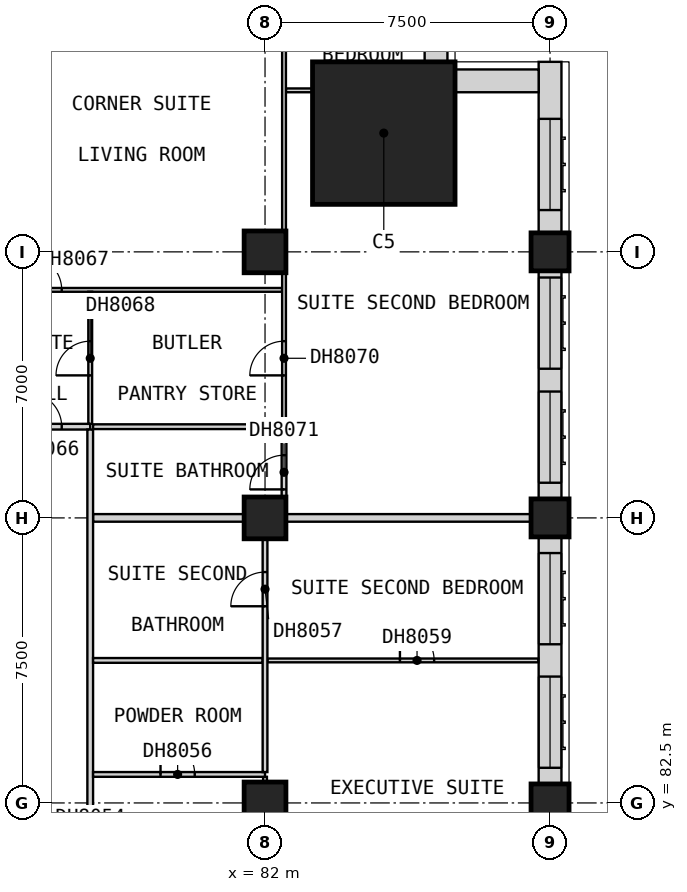
"""IFC4 building model, lengths in metres.
Left out: names, types, materials, properties, quantities, classifications, styles, units other than length and angle.
Written with IfcOpenShell. Run it as: python <this file> out.ifc"""

import sys

from ifc_helpers import new_model, si_unit, direction, frame, frame_2d, origin, origin_2d, place, context, subcontext, project, spatial, rectangle, extrude, element, fill, save


model = new_model("IFC4")
c1 = context("Model", 3, precision=1e-05, world=origin(), true_north=direction((0.0, 1.0)))
c2 = subcontext(c1, "Body", "Model", "MODEL_VIEW")
j1 = project(units=[si_unit("LENGTHUNIT", "METRE"), si_unit("PLANEANGLEUNIT", "RADIAN")], contexts=[c1])
p1 = place(None, origin())
s1 = spatial("IfcSite", under=j1, at=p1, CompositionType="ELEMENT")
p2 = place(p1, origin())
s2 = spatial("IfcBuilding", under=s1, at=p2, CompositionType="ELEMENT")
p3 = place(p2, frame((0.0, 0.0, 89.9)))
s3 = spatial("IfcBuildingStorey", under=s2, at=p3, CompositionType="ELEMENT", Elevation=89.9)
for number, where, z_axis, x_axis in (
    (1, (82.0, 82.5, 0.0), (0.0, 0.0, 1.0), (1.0, 0.0, 0.0)),
    (2, (82.0, 90.0, 0.0), (0.0, 0.0, 1.0), (1.0, 0.0, 0.0)),
    (3, (82.0, 97.0, 0.0), (0.0, 0.0, 1.0), (1.0, 0.0, 0.0)),
):
    element("IfcColumn", number, at=place(p3, frame(where, z_axis=z_axis, x_axis=x_axis)), inside=s3, PredefinedType="COLUMN", context=c2, shape_type="SweptSolid", body=[
        extrude(rectangle(XDim=1.1, YDim=1.1, at=origin_2d()), origin(), (0.0, 0.0, 1.0), 3.6),
    ])
for number, where, z_axis, x_axis in (
    (4, (89.5, 82.5, 0.0), (0.0, 0.0, 1.0), (1.0, 0.0, 0.0)),
    (5, (89.5, 90.0, 0.0), (0.0, 0.0, 1.0), (1.0, 0.0, 0.0)),
    (6, (89.5, 97.0, 0.0), (0.0, 0.0, 1.0), (1.0, 0.0, 0.0)),
):
    element("IfcColumn", number, at=place(p3, frame(where, z_axis=z_axis, x_axis=x_axis)), inside=s3, PredefinedType="COLUMN", context=c2, shape_type="SweptSolid", body=[
        extrude(rectangle(XDim=1.0, YDim=1.0, at=origin_2d()), origin(), (0.0, 0.0, 1.0), 3.6),
    ])
p4 = place(p3, frame((85.125, 100.125, 0.0), z_axis=(0.0, 0.0, 1.0), x_axis=(1.0, 0.0, 0.0)))
e7 = element("IfcColumn", 7, at=p4, inside=s3, PredefinedType="COLUMN", context=c2, shape_type="SweptSolid", body=[
    extrude(rectangle(XDim=3.75, YDim=3.75, at=origin_2d()), origin(), (0.0, 0.0, 1.0), 3.6),
])
p5 = place(p3, frame((89.5, 83.0, 0.0), z_axis=(0.0, 0.0, 1.0), x_axis=(0.0, 1.0, 0.0)))
e8 = element("IfcWall", 8, at=p5, inside=s3, PredefinedType="SOLIDWALL", context=c2, shape_type="SweptSolid", body=[
    extrude(rectangle(XDim=6.5, YDim=0.6, at=frame_2d((3.25, 0.0))), origin(), (0.0, 0.0, 1.0), 2.85),
])
p6 = place(p5, frame((0.425, 0.0, 0.8)))
e9 = element("IfcOpeningElement", 9, at=p6, cuts=e8, PredefinedType="OPENING", context=c2, shape_type="SweptSolid", body=[
    extrude(rectangle(XDim=2.4, YDim=1.8, at=frame_2d((1.2, 0.9))), frame((0.0, 0.31, 0.0), z_axis=(0.0, -1.0, 0.0), x_axis=(1.0, 0.0, 0.0)), (0.0, 0.0, 1.0), 0.62),
])
p7 = place(p5, frame((3.675, 0.0, 0.8)))
e10 = element("IfcOpeningElement", 10, at=p7, cuts=e8, PredefinedType="OPENING", context=c2, shape_type="SweptSolid", body=[
    extrude(rectangle(XDim=2.4, YDim=1.8, at=frame_2d((1.2, 0.9))), frame((0.0, 0.31, 0.0), z_axis=(0.0, -1.0, 0.0), x_axis=(1.0, 0.0, 0.0)), (0.0, 0.0, 1.0), 0.62),
])
p8 = place(p3, frame((89.5, 90.5, 0.0), z_axis=(0.0, 0.0, 1.0), x_axis=(0.0, 1.0, 0.0)))
e11 = element("IfcWall", 11, at=p8, inside=s3, PredefinedType="SOLIDWALL", context=c2, shape_type="SweptSolid", body=[
    extrude(rectangle(XDim=6.0, YDim=0.6, at=frame_2d((3.0, 0.0))), origin(), (0.0, 0.0, 1.0), 2.85),
])
p9 = place(p8, frame((0.425, 0.0, 0.8)))
e12 = element("IfcOpeningElement", 12, at=p9, cuts=e11, PredefinedType="OPENING", context=c2, shape_type="SweptSolid", body=[
    extrude(rectangle(XDim=2.4, YDim=1.8, at=frame_2d((1.2, 0.9))), frame((0.0, 0.31, 0.0), z_axis=(0.0, -1.0, 0.0), x_axis=(1.0, 0.0, 0.0)), (0.0, 0.0, 1.0), 0.62),
])
p10 = place(p8, frame((3.425, 0.0, 0.8)))
e13 = element("IfcOpeningElement", 13, at=p10, cuts=e11, PredefinedType="OPENING", context=c2, shape_type="SweptSolid", body=[
    extrude(rectangle(XDim=2.4, YDim=1.8, at=frame_2d((1.2, 0.9))), frame((0.0, 0.31, 0.0), z_axis=(0.0, -1.0, 0.0), x_axis=(1.0, 0.0, 0.0)), (0.0, 0.0, 1.0), 0.62),
])
p11 = place(p3, frame((89.5, 97.5, 0.0), z_axis=(0.0, 0.0, 1.0), x_axis=(0.0, 1.0, 0.0)))
e14 = element("IfcWall", 14, at=p11, inside=s3, PredefinedType="SOLIDWALL", context=c2, shape_type="SweptSolid", body=[
    extrude(rectangle(XDim=4.5, YDim=0.6, at=frame_2d((2.25, 0.0))), origin(), (0.0, 0.0, 1.0), 2.85),
])
p12 = place(p11, frame((0.6, 0.0, 0.8)))
e15 = element("IfcOpeningElement", 15, at=p12, cuts=e14, PredefinedType="OPENING", context=c2, shape_type="SweptSolid", body=[
    extrude(rectangle(XDim=2.4, YDim=1.8, at=frame_2d((1.2, 0.9))), frame((0.0, 0.31, 0.0), z_axis=(0.0, -1.0, 0.0), x_axis=(1.0, 0.0, 0.0)), (0.0, 0.0, 1.0), 0.62),
])
for number, where, z_axis, x_axis in (
    (16, (89.2, 101.5, 0.0), (0.0, 0.0, 1.0), (-1.0, 0.0, 0.0)),
    (17, (86.5, 102.0, 0.0), (0.0, 0.0, 1.0), (0.0, 1.0, 0.0)),
):
    element("IfcWall", number, at=place(p3, frame(where, z_axis=z_axis, x_axis=x_axis)), inside=s3, PredefinedType="SOLIDWALL", context=c2, shape_type="SweptSolid", body=[
        extrude(rectangle(XDim=2.2, YDim=0.6, at=frame_2d((1.1, 0.0))), origin(), (0.0, 0.0, 1.0), 3.35),
    ])
p13 = place(p3, frame((77.475, 90.0, 0.0), z_axis=(0.0, 0.0, 1.0), x_axis=(1.0, 0.0, 0.0)))
e18 = element("IfcWall", 18, at=p13, inside=s3, PredefinedType="PARTITIONING", context=c2, shape_type="SweptSolid", body=[
    extrude(rectangle(XDim=12.525, YDim=0.2, at=frame_2d((6.262, 0.0))), origin(), (0.0, 0.0, 1.0), 3.35),
])
p14 = place(p3, frame((33.75, 92.4, 0.0), z_axis=(0.0, 0.0, 1.0), x_axis=(1.0, 0.0, 0.0)))
e19 = element("IfcWall", 19, at=p14, inside=s3, PredefinedType="PARTITIONING", context=c2, shape_type="SweptSolid", body=[
    extrude(rectangle(XDim=43.65, YDim=0.15, at=frame_2d((21.825, 0.0))), origin(), (0.0, 0.0, 1.0), 3.35),
])
p15 = place(p14, frame((5.175, 0.0, 0.0)))
e20 = element("IfcOpeningElement", 20, at=p15, cuts=e19, PredefinedType="OPENING", context=c2, shape_type="SweptSolid", body=[
    extrude(rectangle(XDim=0.9, YDim=2.1, at=frame_2d((0.45, 1.05))), frame((0.0, 0.085, 0.0), z_axis=(0.0, -1.0, 0.0), x_axis=(1.0, 0.0, 0.0)), (0.0, 0.0, 1.0), 0.17),
])
p16 = place(p14, frame((13.05, 0.0, 0.0)))
e21 = element("IfcOpeningElement", 21, at=p16, cuts=e19, PredefinedType="OPENING", context=c2, shape_type="SweptSolid", body=[
    extrude(rectangle(XDim=0.9, YDim=2.1, at=frame_2d((0.45, 1.05))), frame((0.0, 0.085, 0.0), z_axis=(0.0, -1.0, 0.0), x_axis=(1.0, 0.0, 0.0)), (0.0, 0.0, 1.0), 0.17),
])
p17 = place(p14, frame((20.55, 0.0, 0.0)))
e22 = element("IfcOpeningElement", 22, at=p17, cuts=e19, PredefinedType="OPENING", context=c2, shape_type="SweptSolid", body=[
    extrude(rectangle(XDim=0.9, YDim=2.1, at=frame_2d((0.45, 1.05))), frame((0.0, 0.085, 0.0), z_axis=(0.0, -1.0, 0.0), x_axis=(1.0, 0.0, 0.0)), (0.0, 0.0, 1.0), 0.17),
])
p18 = place(p14, frame((32.363, 0.0, 0.0)))
e23 = element("IfcOpeningElement", 23, at=p18, cuts=e19, PredefinedType="OPENING", context=c2, shape_type="SweptSolid", body=[
    extrude(rectangle(XDim=0.9, YDim=2.1, at=frame_2d((0.45, 1.05))), frame((0.0, 0.085, 0.0), z_axis=(0.0, -1.0, 0.0), x_axis=(1.0, 0.0, 0.0)), (0.0, 0.0, 1.0), 0.17),
])
p19 = place(p14, frame((39.3, 0.0, 0.0)))
e24 = element("IfcOpeningElement", 24, at=p19, cuts=e19, PredefinedType="OPENING", context=c2, shape_type="SweptSolid", body=[
    extrude(rectangle(XDim=0.9, YDim=2.1, at=frame_2d((0.45, 1.05))), frame((0.0, 0.085, 0.0), z_axis=(0.0, -1.0, 0.0), x_axis=(1.0, 0.0, 0.0)), (0.0, 0.0, 1.0), 0.17),
])
p20 = place(p14, frame((42.0, 0.0, 0.0)))
e25 = element("IfcOpeningElement", 25, at=p20, cuts=e19, PredefinedType="OPENING", context=c2, shape_type="SweptSolid", body=[
    extrude(rectangle(XDim=0.9, YDim=2.1, at=frame_2d((0.45, 1.05))), frame((0.0, 0.085, 0.0), z_axis=(0.0, -1.0, 0.0), x_axis=(1.0, 0.0, 0.0)), (0.0, 0.0, 1.0), 0.17),
])
p21 = place(p3, frame((77.4, 50.175, 0.0), z_axis=(0.0, 0.0, 1.0), x_axis=(0.0, 1.0, 0.0)))
e26 = element("IfcWall", 26, at=p21, inside=s3, PredefinedType="PARTITIONING", context=c2, shape_type="SweptSolid", body=[
    extrude(rectangle(XDim=42.15, YDim=0.15, at=frame_2d((21.075, 0.0))), origin(), (0.0, 0.0, 1.0), 3.35),
])
p22 = place(p21, frame((7.875, 0.0, 0.0)))
e27 = element("IfcOpeningElement", 27, at=p22, cuts=e26, PredefinedType="OPENING", context=c2, shape_type="SweptSolid", body=[
    extrude(rectangle(XDim=0.9, YDim=2.1, at=frame_2d((0.45, 1.05))), frame((0.0, 0.085, 0.0), z_axis=(0.0, -1.0, 0.0), x_axis=(1.0, 0.0, 0.0)), (0.0, 0.0, 1.0), 0.17),
])
p23 = place(p21, frame((15.375, 0.0, 0.0)))
e28 = element("IfcOpeningElement", 28, at=p23, cuts=e26, PredefinedType="OPENING", context=c2, shape_type="SweptSolid", body=[
    extrude(rectangle(XDim=0.9, YDim=2.1, at=frame_2d((0.45, 1.05))), frame((0.0, 0.085, 0.0), z_axis=(0.0, -1.0, 0.0), x_axis=(1.0, 0.0, 0.0)), (0.0, 0.0, 1.0), 0.17),
])
p24 = place(p21, frame((30.375, 0.0, 0.0)))
e29 = element("IfcOpeningElement", 29, at=p24, cuts=e26, PredefinedType="OPENING", context=c2, shape_type="SweptSolid", body=[
    extrude(rectangle(XDim=0.9, YDim=2.1, at=frame_2d((0.45, 1.05))), frame((0.0, 0.085, 0.0), z_axis=(0.0, -1.0, 0.0), x_axis=(1.0, 0.0, 0.0)), (0.0, 0.0, 1.0), 0.17),
])
p25 = place(p3, frame((82.062, 86.25, 0.0), z_axis=(0.0, 0.0, 1.0), x_axis=(1.0, 0.0, 0.0)))
e30 = element("IfcWall", 30, at=p25, inside=s3, PredefinedType="PARTITIONING", context=c2, shape_type="SweptSolid", body=[
    extrude(rectangle(XDim=7.127, YDim=0.1, at=frame_2d((3.564, 0.0))), origin(), (0.0, 0.0, 1.0), 3.35),
])
p26 = place(p25, frame((3.488, 0.0, 0.0)))
e31 = element("IfcOpeningElement", 31, at=p26, cuts=e30, PredefinedType="OPENING", context=c2, shape_type="SweptSolid", body=[
    extrude(rectangle(XDim=0.9, YDim=2.1, at=frame_2d((0.45, 1.05))), frame((0.0, 0.06, 0.0), z_axis=(0.0, -1.0, 0.0), x_axis=(1.0, 0.0, 0.0)), (0.0, 0.0, 1.0), 0.12),
])
p27 = place(p3, frame((75.1, 96.0, 0.0), z_axis=(0.0, 0.0, 1.0), x_axis=(1.0, 0.0, 0.0)))
e32 = element("IfcWall", 32, at=p27, inside=s3, PredefinedType="PARTITIONING", context=c2, shape_type="SweptSolid", body=[
    extrude(rectangle(XDim=7.35, YDim=0.1, at=frame_2d((3.675, 0.0))), origin(), (0.0, 0.0, 1.0), 3.35),
])
p28 = place(p27, frame((0.65, 0.0, 0.0)))
e33 = element("IfcOpeningElement", 33, at=p28, cuts=e32, PredefinedType="OPENING", context=c2, shape_type="SweptSolid", body=[
    extrude(rectangle(XDim=0.9, YDim=2.1, at=frame_2d((0.45, 1.05))), frame((0.0, 0.06, 0.0), z_axis=(0.0, -1.0, 0.0), x_axis=(1.0, 0.0, 0.0)), (0.0, 0.0, 1.0), 0.12),
])
p29 = place(p3, frame((82.55, 101.25, 0.0), z_axis=(0.0, 0.0, 1.0), x_axis=(1.0, 0.0, 0.0)))
e34 = element("IfcWall", 34, at=p29, inside=s3, PredefinedType="PARTITIONING", context=c2, shape_type="SweptSolid", body=[
    extrude(rectangle(XDim=4.44, YDim=0.1, at=frame_2d((2.22, 0.0))), origin(), (0.0, 0.0, 1.0), 3.35),
])
p30 = place(p3, frame((77.4, 92.475, 0.0), z_axis=(0.0, 0.0, 1.0), x_axis=(0.0, 1.0, 0.0)))
e35 = element("IfcWall", 35, at=p30, inside=s3, PredefinedType="PARTITIONING", context=c2, shape_type="SweptSolid", body=[
    extrude(rectangle(XDim=3.475, YDim=0.1, at=frame_2d((1.737, 0.0))), origin(), (0.0, 0.0, 1.0), 3.35),
])
p31 = place(p30, frame((1.275, 0.0, 0.0)))
e36 = element("IfcOpeningElement", 36, at=p31, cuts=e35, PredefinedType="OPENING", context=c2, shape_type="SweptSolid", body=[
    extrude(rectangle(XDim=0.9, YDim=2.1, at=frame_2d((0.45, 1.05))), frame((0.0, 0.06, 0.0), z_axis=(0.0, -1.0, 0.0), x_axis=(1.0, 0.0, 0.0)), (0.0, 0.0, 1.0), 0.12),
])
p32 = place(p3, frame((82.0, 78.812, 0.0), z_axis=(0.0, 0.0, 1.0), x_axis=(0.0, 1.0, 0.0)))
e37 = element("IfcWall", 37, at=p32, inside=s3, PredefinedType="PARTITIONING", context=c2, shape_type="SweptSolid", body=[
    extrude(rectangle(XDim=4.375, YDim=0.1, at=frame_2d((2.188, 0.0))), origin(), (0.0, 0.0, 1.0), 3.35),
])
p33 = place(p32, frame((1.738, 0.0, 0.0)))
e38 = element("IfcOpeningElement", 38, at=p33, cuts=e37, PredefinedType="OPENING", context=c2, shape_type="SweptSolid", body=[
    extrude(rectangle(XDim=0.9, YDim=2.1, at=frame_2d((0.45, 1.05))), frame((0.0, 0.06, 0.0), z_axis=(0.0, -1.0, 0.0), x_axis=(1.0, 0.0, 0.0)), (0.0, 0.0, 1.0), 0.12),
])
p34 = place(p3, frame((82.5, 92.462, 0.0), z_axis=(0.0, 0.0, 1.0), x_axis=(0.0, 1.0, 0.0)))
e39 = element("IfcWall", 39, at=p34, inside=s3, PredefinedType="PARTITIONING", context=c2, shape_type="SweptSolid", body=[
    extrude(rectangle(XDim=11.728, YDim=0.1, at=frame_2d((5.864, 0.0))), origin(), (0.0, 0.0, 1.0), 3.35),
])
p35 = place(p34, frame((10.212, 0.0, 0.0)))
e40 = element("IfcOpeningElement", 40, at=p35, cuts=e39, PredefinedType="OPENING", context=c2, shape_type="SweptSolid", body=[
    extrude(rectangle(XDim=0.9, YDim=2.1, at=frame_2d((0.45, 1.05))), frame((0.0, 0.06, 0.0), z_axis=(0.0, -1.0, 0.0), x_axis=(1.0, 0.0, 0.0)), (0.0, 0.0, 1.0), 0.12),
])
p36 = place(p34, frame((1.288, 0.0, 0.0)))
e41 = element("IfcOpeningElement", 41, at=p36, cuts=e39, PredefinedType="OPENING", context=c2, shape_type="SweptSolid", body=[
    extrude(rectangle(XDim=0.9, YDim=2.1, at=frame_2d((0.45, 1.05))), frame((0.0, 0.06, 0.0), z_axis=(0.0, -1.0, 0.0), x_axis=(1.0, 0.0, 0.0)), (0.0, 0.0, 1.0), 0.12),
])
p37 = place(p3, frame((77.475, 83.25, 0.0), z_axis=(0.0, 0.0, 1.0), x_axis=(1.0, 0.0, 0.0)))
e42 = element("IfcWall", 42, at=p37, inside=s3, PredefinedType="PARTITIONING", context=c2, shape_type="SweptSolid", body=[
    extrude(rectangle(XDim=4.525, YDim=0.125, at=frame_2d((2.262, 0.0))), origin(), (0.0, 0.0, 1.0), 3.35),
])
p38 = place(p37, frame((1.775, 0.0, 0.0)))
e43 = element("IfcOpeningElement", 43, at=p38, cuts=e42, PredefinedType="OPENING", context=c2, shape_type="SweptSolid", body=[
    extrude(rectangle(XDim=0.9, YDim=2.1, at=frame_2d((0.45, 1.05))), frame((0.0, 0.073, 0.0), z_axis=(0.0, -1.0, 0.0), x_axis=(1.0, 0.0, 0.0)), (0.0, 0.0, 1.0), 0.145),
])
p39 = place(p3, frame((77.475, 86.25, 0.0), z_axis=(0.0, 0.0, 1.0), x_axis=(1.0, 0.0, 0.0)))
e44 = element("IfcWall", 44, at=p39, inside=s3, PredefinedType="PARTITIONING", context=c2, shape_type="SweptSolid", body=[
    extrude(rectangle(XDim=4.462, YDim=0.125, at=frame_2d((2.231, 0.0))), origin(), (0.0, 0.0, 1.0), 3.35),
])
p40 = place(p3, frame((77.475, 92.4, 0.0), z_axis=(0.0, 0.0, 1.0), x_axis=(1.0, 0.0, 0.0)))
e45 = element("IfcWall", 45, at=p40, inside=s3, PredefinedType="PARTITIONING", context=c2, shape_type="SweptSolid", body=[
    extrude(rectangle(XDim=5.025, YDim=0.125, at=frame_2d((2.512, 0.0))), origin(), (0.0, 0.0, 1.0), 3.35),
])
p41 = place(p3, frame((82.0, 83.312, 0.0), z_axis=(0.0, 0.0, 1.0), x_axis=(0.0, 1.0, 0.0)))
e46 = element("IfcWall", 46, at=p41, inside=s3, PredefinedType="PARTITIONING", context=c2, shape_type="SweptSolid", body=[
    extrude(rectangle(XDim=6.587, YDim=0.125, at=frame_2d((3.294, 0.0))), origin(), (0.0, 0.0, 1.0), 3.35),
])
p42 = place(p41, frame((4.363, 0.0, 0.0)))
e47 = element("IfcOpeningElement", 47, at=p42, cuts=e46, PredefinedType="OPENING", context=c2, shape_type="SweptSolid", body=[
    extrude(rectangle(XDim=0.9, YDim=2.1, at=frame_2d((0.45, 1.05))), frame((0.0, 0.073, 0.0), z_axis=(0.0, -1.0, 0.0), x_axis=(1.0, 0.0, 0.0)), (0.0, 0.0, 1.0), 0.145),
])
p43 = place(p3, frame((82.5, 90.1, 0.0), z_axis=(0.0, 0.0, 1.0), x_axis=(0.0, 1.0, 0.0)))
e48 = element("IfcWall", 48, at=p43, inside=s3, PredefinedType="PARTITIONING", context=c2, shape_type="SweptSolid", body=[
    extrude(rectangle(XDim=2.237, YDim=0.125, at=frame_2d((1.119, 0.0))), origin(), (0.0, 0.0, 1.0), 3.35),
])
p44 = place(p43, frame((0.65, 0.0, 0.0)))
e49 = element("IfcOpeningElement", 49, at=p44, cuts=e48, PredefinedType="OPENING", context=c2, shape_type="SweptSolid", body=[
    extrude(rectangle(XDim=0.9, YDim=2.1, at=frame_2d((0.45, 1.05))), frame((0.0, 0.073, 0.0), z_axis=(0.0, -1.0, 0.0), x_axis=(1.0, 0.0, 0.0)), (0.0, 0.0, 1.0), 0.145),
])
p45 = place(p6, origin())
e50 = element("IfcWindow", 50, at=p45, inside=s3, PartitioningType="SINGLE_PANEL", PredefinedType="WINDOW", context=c2, shape_type="SweptSolid", body=[
    extrude(rectangle(XDim=2.4, YDim=1.8, at=frame_2d((1.2, 0.9))), frame((0.0, -0.07, 0.0), z_axis=(0.0, -1.0, 0.0), x_axis=(1.0, 0.0, 0.0)), (0.0, 0.0, 1.0), 0.06),
])
fill(e9, e50)
p46 = place(p7, origin())
e51 = element("IfcWindow", 51, at=p46, inside=s3, PartitioningType="SINGLE_PANEL", PredefinedType="WINDOW", context=c2, shape_type="SweptSolid", body=[
    extrude(rectangle(XDim=2.4, YDim=1.8, at=frame_2d((1.2, 0.9))), frame((0.0, -0.07, 0.0), z_axis=(0.0, -1.0, 0.0), x_axis=(1.0, 0.0, 0.0)), (0.0, 0.0, 1.0), 0.06),
])
fill(e10, e51)
p47 = place(p9, origin())
e52 = element("IfcWindow", 52, at=p47, inside=s3, PartitioningType="SINGLE_PANEL", PredefinedType="WINDOW", context=c2, shape_type="SweptSolid", body=[
    extrude(rectangle(XDim=2.4, YDim=1.8, at=frame_2d((1.2, 0.9))), frame((0.0, -0.07, 0.0), z_axis=(0.0, -1.0, 0.0), x_axis=(1.0, 0.0, 0.0)), (0.0, 0.0, 1.0), 0.06),
])
fill(e12, e52)
p48 = place(p10, origin())
e53 = element("IfcWindow", 53, at=p48, inside=s3, PartitioningType="SINGLE_PANEL", PredefinedType="WINDOW", context=c2, shape_type="SweptSolid", body=[
    extrude(rectangle(XDim=2.4, YDim=1.8, at=frame_2d((1.2, 0.9))), frame((0.0, -0.07, 0.0), z_axis=(0.0, -1.0, 0.0), x_axis=(1.0, 0.0, 0.0)), (0.0, 0.0, 1.0), 0.06),
])
fill(e13, e53)
p49 = place(p12, origin())
e54 = element("IfcWindow", 54, at=p49, inside=s3, PartitioningType="SINGLE_PANEL", PredefinedType="WINDOW", context=c2, shape_type="SweptSolid", body=[
    extrude(rectangle(XDim=2.4, YDim=1.8, at=frame_2d((1.2, 0.9))), frame((0.0, -0.07, 0.0), z_axis=(0.0, -1.0, 0.0), x_axis=(1.0, 0.0, 0.0)), (0.0, 0.0, 1.0), 0.06),
])
fill(e15, e54)
p50 = place(p38, origin())
e55 = element("IfcDoor", 55, at=p50, inside=s3, OperationType="SINGLE_SWING_RIGHT", PredefinedType="DOOR", context=c2, shape_type="SweptSolid", body=[
    extrude(rectangle(XDim=0.9, YDim=2.1, at=frame_2d((0.45, 1.05))), frame((0.0, 0.025, 0.0), z_axis=(0.0, -1.0, 0.0), x_axis=(1.0, 0.0, 0.0)), (0.0, 0.0, 1.0), 0.05),
])
fill(e43, e55)
p51 = place(p42, origin())
e56 = element("IfcDoor", 56, at=p51, inside=s3, OperationType="SINGLE_SWING_LEFT", PredefinedType="DOOR", context=c2, shape_type="SweptSolid", body=[
    extrude(rectangle(XDim=0.9, YDim=2.1, at=frame_2d((0.45, 1.05))), frame((0.0, 0.025, 0.0), z_axis=(0.0, -1.0, 0.0), x_axis=(1.0, 0.0, 0.0)), (0.0, 0.0, 1.0), 0.05),
])
fill(e47, e56)
p52 = place(p26, origin())
e57 = element("IfcDoor", 57, at=p52, inside=s3, OperationType="SINGLE_SWING_RIGHT", PredefinedType="DOOR", context=c2, shape_type="SweptSolid", body=[
    extrude(rectangle(XDim=0.9, YDim=2.1, at=frame_2d((0.45, 1.05))), frame((0.0, 0.025, 0.0), z_axis=(0.0, -1.0, 0.0), x_axis=(1.0, 0.0, 0.0)), (0.0, 0.0, 1.0), 0.05),
])
fill(e31, e57)
p53 = place(p20, origin())
e58 = element("IfcDoor", 58, at=p53, inside=s3, OperationType="SINGLE_SWING_RIGHT", PredefinedType="DOOR", context=c2, shape_type="SweptSolid", body=[
    extrude(rectangle(XDim=0.9, YDim=2.1, at=frame_2d((0.45, 1.05))), frame((0.0, 0.025, 0.0), z_axis=(0.0, -1.0, 0.0), x_axis=(1.0, 0.0, 0.0)), (0.0, 0.0, 1.0), 0.05),
])
fill(e25, e58)
p54 = place(p28, origin())
e59 = element("IfcDoor", 59, at=p54, inside=s3, OperationType="SINGLE_SWING_LEFT", PredefinedType="DOOR", context=c2, shape_type="SweptSolid", body=[
    extrude(rectangle(XDim=0.9, YDim=2.1, at=frame_2d((0.45, 1.05))), frame((0.0, 0.025, 0.0), z_axis=(0.0, -1.0, 0.0), x_axis=(1.0, 0.0, 0.0)), (0.0, 0.0, 1.0), 0.05),
])
fill(e33, e59)
p55 = place(p31, origin())
e60 = element("IfcDoor", 60, at=p55, inside=s3, OperationType="SINGLE_SWING_RIGHT", PredefinedType="DOOR", context=c2, shape_type="SweptSolid", body=[
    extrude(rectangle(XDim=0.9, YDim=2.1, at=frame_2d((0.45, 1.05))), frame((0.0, 0.025, 0.0), z_axis=(0.0, -1.0, 0.0), x_axis=(1.0, 0.0, 0.0)), (0.0, 0.0, 1.0), 0.05),
])
fill(e36, e60)
p56 = place(p36, origin())
e61 = element("IfcDoor", 61, at=p56, inside=s3, OperationType="SINGLE_SWING_RIGHT", PredefinedType="DOOR", context=c2, shape_type="SweptSolid", body=[
    extrude(rectangle(XDim=0.9, YDim=2.1, at=frame_2d((0.45, 1.05))), frame((0.0, 0.025, 0.0), z_axis=(0.0, -1.0, 0.0), x_axis=(1.0, 0.0, 0.0)), (0.0, 0.0, 1.0), 0.05),
])
fill(e41, e61)
p57 = place(p44, origin())
e62 = element("IfcDoor", 62, at=p57, inside=s3, OperationType="SINGLE_SWING_LEFT", PredefinedType="DOOR", context=c2, shape_type="SweptSolid", body=[
    extrude(rectangle(XDim=0.9, YDim=2.1, at=frame_2d((0.45, 1.05))), frame((0.0, 0.025, 0.0), z_axis=(0.0, -1.0, 0.0), x_axis=(1.0, 0.0, 0.0)), (0.0, 0.0, 1.0), 0.05),
])
fill(e49, e62)
save(model, sys.argv[1])
